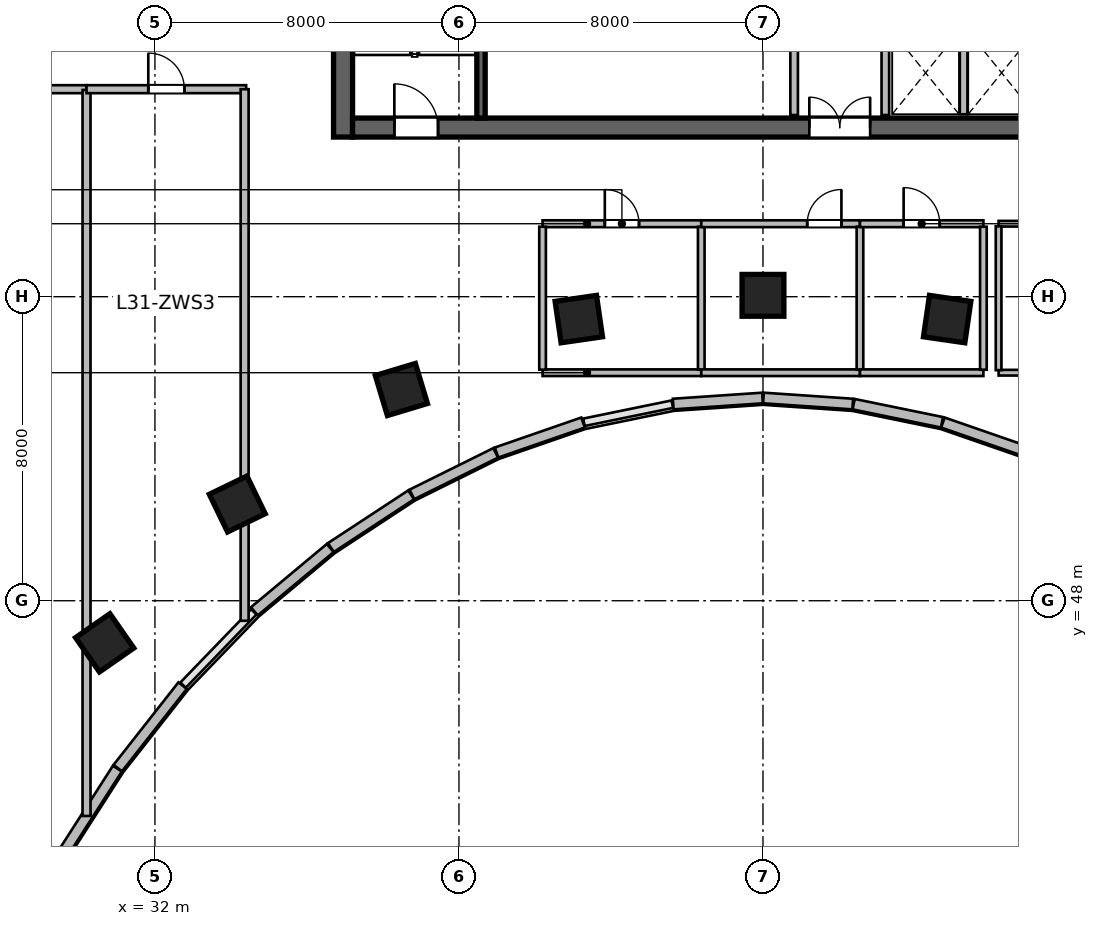
"""IFC4 building model, lengths in metres.
Left out: names, types, materials, properties, quantities, classifications, styles, units other than length and angle.
Written with IfcOpenShell. Run it as: python <this file> out.ifc"""

import sys

from ifc_helpers import new_model, si_unit, direction, frame, frame_2d, origin, origin_2d, place, context, subcontext, project, spatial, rectangle, extrude, source, transform, mapped, element, fill, save


model = new_model("IFC4")
c1 = context("Model", 3, precision=1e-05, world=origin(), true_north=direction((0.0, 1.0)))
c2 = subcontext(c1, "Body", "Model", "MODEL_VIEW")
j1 = project(units=[si_unit("LENGTHUNIT", "METRE"), si_unit("PLANEANGLEUNIT", "RADIAN")], contexts=[c1])
p1 = place(None, origin())
s1 = spatial("IfcSite", under=j1, at=p1, CompositionType="ELEMENT")
p2 = place(p1, origin())
s2 = spatial("IfcBuilding", under=s1, at=p2, CompositionType="ELEMENT")
p3 = place(p2, frame((0.0, 0.0, 131.1)))
s3 = spatial("IfcBuildingStorey", under=s2, at=p3, CompositionType="ELEMENT", Elevation=131.1)
m1 = source(origin(), c2, "Body", "SweptSolid", [
    extrude(rectangle(XDim=12.0, YDim=0.5, at=frame_2d((6.0, 0.0))), origin(), (0.0, 0.0, 1.0), 3.9),
])
p4 = place(p3, frame((36.95, 60.2, 0.0), z_axis=(0.0, 0.0, 1.0), x_axis=(0.0, 1.0, 0.0)))
e1 = element("IfcWall", 1, at=p4, inside=s3, PredefinedType="SHEAR", context=c2, shape_type="MappedRepresentation", body=[
    mapped(m1, transform((0.0, 0.0, 0.0), scale=1.0)),
])
m2 = source(origin(), c2, "Body", "SweptSolid", [
    extrude(rectangle(XDim=21.6, YDim=0.5, at=frame_2d((10.8, 0.0))), origin(), (0.0, 0.0, 1.0), 3.9),
])
p5 = place(p3, frame((37.2, 60.45, 0.0), z_axis=(0.0, 0.0, 1.0), x_axis=(1.0, 0.0, 0.0)))
e2 = element("IfcWall", 2, at=p5, inside=s3, PredefinedType="SHEAR", context=c2, shape_type="MappedRepresentation", body=[
    mapped(m2, transform((0.0, 0.0, 0.0), scale=1.0)),
])
p6 = place(p5, frame((1.1, 0.0, 0.0)))
e3 = element("IfcOpeningElement", 3, at=p6, cuts=e2, PredefinedType="OPENING", context=c2, shape_type="SweptSolid", body=[
    extrude(rectangle(XDim=1.15, YDim=2.15, at=frame_2d((0.575, 1.075))), frame((0.0, 0.26, 0.0), z_axis=(0.0, -1.0, 0.0), x_axis=(1.0, 0.0, 0.0)), (0.0, 0.0, 1.0), 0.52),
])
p7 = place(p5, frame((19.5, 0.0, 0.0)))
e4 = element("IfcOpeningElement", 4, at=p7, cuts=e2, PredefinedType="OPENING", context=c2, shape_type="SweptSolid", body=[
    extrude(rectangle(XDim=0.9, YDim=2.1, at=frame_2d((0.45, 1.05))), frame((0.0, 0.26, 0.0), z_axis=(0.0, -1.0, 0.0), x_axis=(1.0, 0.0, 0.0)), (0.0, 0.0, 1.0), 0.52),
])
p8 = place(p5, frame((12.02, 0.0, 0.0)))
e5 = element("IfcOpeningElement", 5, at=p8, cuts=e2, PredefinedType="OPENING", context=c2, shape_type="SweptSolid", body=[
    extrude(rectangle(XDim=1.6, YDim=2.15, at=frame_2d((0.8, 1.075))), frame((0.0, 0.26, 0.0), z_axis=(0.0, -1.0, 0.0), x_axis=(1.0, 0.0, 0.0)), (0.0, 0.0, 1.0), 0.52),
])
m3 = source(origin(), c2, "Body", "SweptSolid", [
    extrude(rectangle(XDim=11.0, YDim=0.22, at=frame_2d((5.5, 0.0))), origin(), (0.0, 0.0, 1.0), 3.9),
])
p9 = place(p3, frame((40.58, 60.7, 0.0), z_axis=(0.0, 0.0, 1.0), x_axis=(0.0, 1.0, 0.0)))
e6 = element("IfcWall", 6, at=p9, inside=s3, PredefinedType="SHEAR", context=c2, shape_type="MappedRepresentation", body=[
    mapped(m3, transform((0.0, 0.0, 0.0), scale=1.0)),
])
m4 = source(origin(), c2, "Body", "SweptSolid", [
    extrude(rectangle(XDim=1.1, YDim=1.1, at=origin_2d()), origin(), (0.0, 0.0, 1.0), 3.9),
])
for number, where, z_axis, x_axis in (
    (7, (30.677, 46.892, 0.0), (0.0, 0.0, 1.0), (-0.571, 0.821, 0.0)),
    (8, (34.166, 50.545, 0.0), (0.0, 0.0, 1.0), (-0.436, 0.9, 0.0)),
    (9, (38.485, 53.558, 0.0), (0.0, 0.0, 1.0), (-0.289, 0.957, 0.0)),
    (10, (43.154, 55.411, 0.0), (0.0, 0.0, 1.0), (-0.143, 0.99, 0.0)),
    (11, (48.0, 56.036, 0.0), (0.0, 0.0, 1.0), (0.0, 1.0, 0.0)),
    (12, (52.846, 55.411, 0.0), (0.0, 0.0, 1.0), (0.143, 0.99, 0.0)),
):
    element("IfcColumn", number, at=place(p3, frame(where, z_axis=z_axis, x_axis=x_axis)), inside=s3, PredefinedType="COLUMN", context=c2, shape_type="MappedRepresentation", body=[
        mapped(m4, transform((0.0, 0.0, 0.0), scale=1.0)),
    ])
m5 = source(origin(), c2, "Body", "SweptSolid", [
    extrude(rectangle(XDim=2.411, YDim=0.28, at=frame_2d((1.205, 0.0))), origin(), (0.0, 0.0, 1.0), 3.65),
])
p10 = place(p3, frame((55.012, 51.899, 0.0), z_axis=(0.0, 0.0, 1.0), x_axis=(-0.944880068161, 0.327416640982, 0.0)))
e13 = element("IfcWall", 13, at=p10, inside=s3, PredefinedType="SOLIDWALL", context=c2, shape_type="MappedRepresentation", body=[
    mapped(m5, transform((0.0, 0.0, 0.0), scale=1.0)),
])
m6 = source(origin(), c2, "Body", "SweptSolid", [
    extrude(rectangle(XDim=2.374, YDim=0.28, at=frame_2d((1.187, 0.0))), origin(), (0.0, 0.0, 1.0), 3.65),
])
p11 = place(p3, frame((52.711, 52.695, 0.0), z_axis=(0.0, 0.0, 1.0), x_axis=(-0.979619827472, 0.200860632341, 0.0)))
e14 = element("IfcWall", 14, at=p11, inside=s3, PredefinedType="SOLIDWALL", context=c2, shape_type="MappedRepresentation", body=[
    mapped(m6, transform((0.0, 0.0, 0.0), scale=1.0)),
])
m7 = source(origin(), c2, "Body", "SweptSolid", [
    extrude(rectangle(XDim=2.355, YDim=0.28, at=frame_2d((1.177, 0.0))), origin(), (0.0, 0.0, 1.0), 3.65),
])
for number, where, z_axis, x_axis in (
    (15, (50.362, 53.175, 0.0), (0.0, 0.0, 1.0), (-0.998, 0.068, 0.0)),
    (16, (47.988, 53.335, 0.0), (0.0, 0.0, 1.0), (-0.998, -0.068, 0.0)),
):
    element("IfcWall", number, at=place(p3, frame(where, z_axis=z_axis, x_axis=x_axis)), inside=s3, PredefinedType="SOLIDWALL", context=c2, shape_type="MappedRepresentation", body=[
        mapped(m7, transform((0.0, 0.0, 0.0), scale=1.0)),
    ])
p12 = place(p3, frame((43.266, 52.689, 0.0), z_axis=(0.0, 0.0, 1.0), x_axis=(-0.944880068161, -0.327416640982, 0.0)))
e17 = element("IfcWall", 17, at=p12, inside=s3, PredefinedType="SOLIDWALL", context=c2, shape_type="MappedRepresentation", body=[
    mapped(m5, transform((0.0, 0.0, 0.0), scale=1.0)),
])
m8 = source(origin(), c2, "Body", "SweptSolid", [
    extrude(rectangle(XDim=2.462, YDim=0.28, at=frame_2d((1.231, 0.0))), origin(), (0.0, 0.0, 1.0), 3.65),
])
p13 = place(p3, frame((40.967, 51.891, 0.0), z_axis=(0.0, 0.0, 1.0), x_axis=(-0.8959882207, -0.444077817917, 0.0)))
e18 = element("IfcWall", 18, at=p13, inside=s3, PredefinedType="SOLIDWALL", context=c2, shape_type="MappedRepresentation", body=[
    mapped(m8, transform((0.0, 0.0, 0.0), scale=1.0)),
])
m9 = source(origin(), c2, "Body", "SweptSolid", [
    extrude(rectangle(XDim=2.527, YDim=0.28, at=frame_2d((1.264, 0.0))), origin(), (0.0, 0.0, 1.0), 3.65),
])
p14 = place(p3, frame((38.742, 50.786, 0.0), z_axis=(0.0, 0.0, 1.0), x_axis=(-0.836011905051, -0.548711303523, 0.0)))
e19 = element("IfcWall", 19, at=p14, inside=s3, PredefinedType="SOLIDWALL", context=c2, shape_type="MappedRepresentation", body=[
    mapped(m9, transform((0.0, 0.0, 0.0), scale=1.0)),
])
m10 = source(origin(), c2, "Body", "SweptSolid", [
    extrude(rectangle(XDim=2.601, YDim=0.28, at=frame_2d((1.3, 0.0))), origin(), (0.0, 0.0, 1.0), 3.65),
])
p15 = place(p3, frame((36.613, 49.387, 0.0), z_axis=(0.0, 0.0, 1.0), x_axis=(-0.76796730295, -0.640489048775, 0.0)))
e20 = element("IfcWall", 20, at=p15, inside=s3, PredefinedType="SOLIDWALL", context=c2, shape_type="MappedRepresentation", body=[
    mapped(m10, transform((0.0, 0.0, 0.0), scale=1.0)),
])
m11 = source(origin(), c2, "Body", "SweptSolid", [
    extrude(rectangle(XDim=2.76, YDim=0.28, at=frame_2d((1.38, 0.0))), origin(), (0.0, 0.0, 1.0), 3.65),
])
p16 = place(p3, frame((32.728, 45.766, 0.0), z_axis=(0.0, 0.0, 1.0), x_axis=(-0.618180818641, -0.786035925047, 0.0)))
e21 = element("IfcWall", 21, at=p16, inside=s3, PredefinedType="SOLIDWALL", context=c2, shape_type="MappedRepresentation", body=[
    mapped(m11, transform((0.0, 0.0, 0.0), scale=1.0)),
])
m12 = source(origin(), c2, "Body", "SweptSolid", [
    extrude(rectangle(XDim=2.84, YDim=0.28, at=frame_2d((1.42, 0.0))), origin(), (0.0, 0.0, 1.0), 3.65),
])
p17 = place(p3, frame((31.011, 43.582, 0.0), z_axis=(0.0, 0.0, 1.0), x_axis=(-0.540214368057, -0.841527442538, 0.0)))
e22 = element("IfcWall", 22, at=p17, inside=s3, PredefinedType="SOLIDWALL", context=c2, shape_type="MappedRepresentation", body=[
    mapped(m12, transform((0.0, 0.0, 0.0), scale=1.0)),
])
m13 = source(origin(), c2, "Body", "SweptSolid", [
    extrude(rectangle(XDim=2.24, YDim=0.2, at=frame_2d((1.12, 0.0))), origin(), (0.0, 0.0, 1.0), 3.65),
])
for number, where, z_axis, x_axis in (
    (23, (48.82, 60.78, 0.0), (0.0, 0.0, 1.0), (0.0, 1.0, 0.0)),
    (24, (51.22, 60.78, 0.0), (0.0, 0.0, 1.0), (0.0, 1.0, 0.0)),
):
    element("IfcWall", number, at=place(p3, frame(where, z_axis=z_axis, x_axis=x_axis)), inside=s3, PredefinedType="SOLIDWALL", context=c2, shape_type="MappedRepresentation", body=[
        mapped(m13, transform((0.0, 0.0, 0.0), scale=1.0)),
    ])
m14 = source(origin(), c2, "Body", "SweptSolid", [
    extrude(rectangle(XDim=2.2, YDim=0.2, at=frame_2d((1.1, 0.0))), origin(), (0.0, 0.0, 1.0), 3.65),
])
p18 = place(p3, frame((53.28, 60.8, 0.0), z_axis=(0.0, 0.0, 1.0), x_axis=(0.0, 1.0, 0.0)))
e25 = element("IfcWall", 25, at=p18, inside=s3, PredefinedType="SOLIDWALL", context=c2, shape_type="MappedRepresentation", body=[
    mapped(m14, transform((0.0, 0.0, 0.0), scale=1.0)),
])
m15 = source(origin(), c2, "Body", "SweptSolid", [
    extrude(rectangle(XDim=4.176, YDim=0.175, at=frame_2d((2.088, 0.0))), origin(), (0.0, 0.0, 1.0), 3.65),
])
p19 = place(p3, frame((42.2, 54.0, 0.0), z_axis=(0.0, 0.0, 1.0), x_axis=(1.0, 0.0, 0.0)))
e26 = element("IfcWall", 26, at=p19, inside=s3, PredefinedType="PARTITIONING", context=c2, shape_type="MappedRepresentation", body=[
    mapped(m15, transform((0.0, 0.0, 0.0), scale=1.0)),
])
m16 = source(origin(), c2, "Body", "SweptSolid", [
    extrude(rectangle(XDim=4.176, YDim=0.18, at=frame_2d((2.088, 0.0))), origin(), (0.0, 0.0, 1.0), 3.65),
])
p20 = place(p3, frame((42.2, 57.92, 0.0), z_axis=(0.0, 0.0, 1.0), x_axis=(1.0, 0.0, 0.0)))
e27 = element("IfcWall", 27, at=p20, inside=s3, PredefinedType="PLUMBINGWALL", context=c2, shape_type="MappedRepresentation", body=[
    mapped(m16, transform((0.0, 0.0, 0.0), scale=1.0)),
])
p21 = place(p20, frame((1.638, 0.0, 0.0)))
e28 = element("IfcOpeningElement", 28, at=p21, cuts=e27, PredefinedType="OPENING", context=c2, shape_type="SweptSolid", body=[
    extrude(rectangle(XDim=0.9, YDim=2.08, at=frame_2d((0.45, 1.04))), frame((0.0, 0.1, 0.0), z_axis=(0.0, -1.0, 0.0), x_axis=(1.0, 0.0, 0.0)), (0.0, 0.0, 1.0), 0.2),
])
m17 = source(origin(), c2, "Body", "SweptSolid", [
    extrude(rectangle(XDim=3.763, YDim=0.175, at=frame_2d((1.881, 0.0))), origin(), (0.0, 0.0, 1.0), 3.65),
])
for number, where, z_axis, x_axis in (
    (29, (42.2, 54.079, 0.0), (0.0, 0.0, 1.0), (0.0, 1.0, 0.0)),
    (30, (46.376, 54.079, 0.0), (0.0, 0.0, 1.0), (0.0, 1.0, 0.0)),
):
    element("IfcWall", number, at=place(p3, frame(where, z_axis=z_axis, x_axis=x_axis)), inside=s3, PredefinedType="PARTITIONING", context=c2, shape_type="MappedRepresentation", body=[
        mapped(m17, transform((0.0, 0.0, 0.0), scale=1.0)),
    ])
p22 = place(p3, frame((46.376, 54.0, 0.0), z_axis=(0.0, 0.0, 1.0), x_axis=(1.0, 0.0, 0.0)))
e31 = element("IfcWall", 31, at=p22, inside=s3, PredefinedType="PARTITIONING", context=c2, shape_type="MappedRepresentation", body=[
    mapped(m15, transform((0.0, 0.0, 0.0), scale=1.0)),
])
p23 = place(p3, frame((46.376, 57.92, 0.0), z_axis=(0.0, 0.0, 1.0), x_axis=(1.0, 0.0, 0.0)))
e32 = element("IfcWall", 32, at=p23, inside=s3, PredefinedType="PLUMBINGWALL", context=c2, shape_type="MappedRepresentation", body=[
    mapped(m16, transform((0.0, 0.0, 0.0), scale=1.0)),
])
p24 = place(p23, frame((2.788, 0.0, 0.0)))
e33 = element("IfcOpeningElement", 33, at=p24, cuts=e32, PredefinedType="OPENING", context=c2, shape_type="SweptSolid", body=[
    extrude(rectangle(XDim=0.9, YDim=2.08, at=frame_2d((0.45, 1.04))), frame((0.0, 0.1, 0.0), z_axis=(0.0, -1.0, 0.0), x_axis=(1.0, 0.0, 0.0)), (0.0, 0.0, 1.0), 0.2),
])
p25 = place(p3, frame((50.552, 54.079, 0.0), z_axis=(0.0, 0.0, 1.0), x_axis=(0.0, 1.0, 0.0)))
e34 = element("IfcWall", 34, at=p25, inside=s3, PredefinedType="PARTITIONING", context=c2, shape_type="MappedRepresentation", body=[
    mapped(m17, transform((0.0, 0.0, 0.0), scale=1.0)),
])
m18 = source(origin(), c2, "Body", "SweptSolid", [
    extrude(rectangle(XDim=3.248, YDim=0.175, at=frame_2d((1.624, 0.0))), origin(), (0.0, 0.0, 1.0), 3.65),
])
p26 = place(p3, frame((50.552, 54.0, 0.0), z_axis=(0.0, 0.0, 1.0), x_axis=(1.0, 0.0, 0.0)))
e35 = element("IfcWall", 35, at=p26, inside=s3, PredefinedType="PARTITIONING", context=c2, shape_type="MappedRepresentation", body=[
    mapped(m18, transform((0.0, 0.0, 0.0), scale=1.0)),
])
m19 = source(origin(), c2, "Body", "SweptSolid", [
    extrude(rectangle(XDim=3.248, YDim=0.18, at=frame_2d((1.624, 0.0))), origin(), (0.0, 0.0, 1.0), 3.65),
])
p27 = place(p3, frame((50.552, 57.92, 0.0), z_axis=(0.0, 0.0, 1.0), x_axis=(1.0, 0.0, 0.0)))
e36 = element("IfcWall", 36, at=p27, inside=s3, PredefinedType="PLUMBINGWALL", context=c2, shape_type="MappedRepresentation", body=[
    mapped(m19, transform((0.0, 0.0, 0.0), scale=1.0)),
])
p28 = place(p27, frame((1.149, 0.0, 0.0)))
e37 = element("IfcOpeningElement", 37, at=p28, cuts=e36, PredefinedType="OPENING", context=c2, shape_type="SweptSolid", body=[
    extrude(rectangle(XDim=0.95, YDim=2.12, at=frame_2d((0.475, 1.06))), frame((0.0, 0.1, 0.0), z_axis=(0.0, -1.0, 0.0), x_axis=(1.0, 0.0, 0.0)), (0.0, 0.0, 1.0), 0.2),
])
p29 = place(p3, frame((53.8, 54.079, 0.0), z_axis=(0.0, 0.0, 1.0), x_axis=(0.0, 1.0, 0.0)))
e38 = element("IfcWall", 38, at=p29, inside=s3, PredefinedType="PARTITIONING", context=c2, shape_type="MappedRepresentation", body=[
    mapped(m17, transform((0.0, 0.0, 0.0), scale=1.0)),
])
m20 = source(origin(), c2, "Body", "SweptSolid", [
    extrude(rectangle(XDim=6.6, YDim=0.15, at=frame_2d((3.3, 0.0))), origin(), (0.0, 0.0, 1.0), 3.095),
])
p30 = place(p3, frame((54.2, 54.0, 0.0), z_axis=(0.0, 0.0, 1.0), x_axis=(1.0, 0.0, 0.0)))
e39 = element("IfcWall", 39, at=p30, inside=s3, PredefinedType="PARTITIONING", context=c2, shape_type="MappedRepresentation", body=[
    mapped(m20, transform((0.0, 0.0, 0.0), scale=1.0)),
])
m21 = source(origin(), c2, "Body", "SweptSolid", [
    extrude(rectangle(XDim=6.6, YDim=0.15, at=frame_2d((3.3, 0.0))), origin(), (0.0, 0.0, 1.0), 3.65),
])
p31 = place(p3, frame((54.2, 57.92, 0.0), z_axis=(0.0, 0.0, 1.0), x_axis=(1.0, 0.0, 0.0)))
e40 = element("IfcWall", 40, at=p31, inside=s3, PredefinedType="PARTITIONING", context=c2, shape_type="MappedRepresentation", body=[
    mapped(m21, transform((0.0, 0.0, 0.0), scale=1.0)),
])
p32 = place(p31, frame((2.825, 0.0, 0.0)))
e41 = element("IfcOpeningElement", 41, at=p32, cuts=e40, PredefinedType="OPENING", context=c2, shape_type="SweptSolid", body=[
    extrude(rectangle(XDim=0.95, YDim=2.1, at=frame_2d((0.475, 1.05))), frame((0.0, 0.085, 0.0), z_axis=(0.0, -1.0, 0.0), x_axis=(1.0, 0.0, 0.0)), (0.0, 0.0, 1.0), 0.17),
])
m22 = source(origin(), c2, "Body", "SweptSolid", [
    extrude(rectangle(XDim=3.785, YDim=0.15, at=frame_2d((1.893, 0.0))), origin(), (0.0, 0.0, 1.0), 3.65),
])
p33 = place(p3, frame((54.2, 54.067, 0.0), z_axis=(0.0, 0.0, 1.0), x_axis=(0.0, 1.0, 0.0)))
e42 = element("IfcWall", 42, at=p33, inside=s3, PredefinedType="PARTITIONING", context=c2, shape_type="MappedRepresentation", body=[
    mapped(m22, transform((0.0, 0.0, 0.0), scale=1.0)),
])
m23 = source(origin(), c2, "Body", "SweptSolid", [
    extrude(rectangle(XDim=4.0, YDim=0.21, at=frame_2d((2.0, 0.0))), origin(), (0.0, 0.0, 1.0), 3.65),
])
p34 = place(p3, frame((26.2, 61.46, 0.0), z_axis=(0.0, 0.0, 1.0), x_axis=(1.0, 0.0, 0.0)))
e43 = element("IfcWall", 43, at=p34, inside=s3, PredefinedType="PARTITIONING", context=c2, shape_type="MappedRepresentation", body=[
    mapped(m23, transform((0.0, 0.0, 0.0), scale=1.0)),
])
p35 = place(p34, frame((1.525, 0.0, 0.0)))
e44 = element("IfcOpeningElement", 44, at=p35, cuts=e43, PredefinedType="OPENING", context=c2, shape_type="SweptSolid", body=[
    extrude(rectangle(XDim=0.95, YDim=2.1, at=frame_2d((0.475, 1.05))), frame((0.0, 0.115, 0.0), z_axis=(0.0, -1.0, 0.0), x_axis=(1.0, 0.0, 0.0)), (0.0, 0.0, 1.0), 0.23),
])
m24 = source(origin(), c2, "Body", "SweptSolid", [
    extrude(rectangle(XDim=19.103, YDim=0.21, at=frame_2d((9.552, 0.0))), origin(), (0.0, 0.0, 1.0), 2.942),
])
p36 = place(p3, frame((30.2, 42.337, 0.0), z_axis=(0.0, 0.0, 1.0), x_axis=(0.0, 1.0, 0.0)))
e45 = element("IfcWall", 45, at=p36, inside=s3, PredefinedType="PARTITIONING", context=c2, shape_type="MappedRepresentation", body=[
    mapped(m24, transform((0.0, 0.0, 0.0), scale=1.0)),
])
m25 = source(origin(), c2, "Body", "SweptSolid", [
    extrude(rectangle(XDim=4.2, YDim=0.21, at=frame_2d((2.1, 0.0))), origin(), (0.0, 0.0, 1.0), 3.65),
])
p37 = place(p3, frame((30.2, 61.46, 0.0), z_axis=(0.0, 0.0, 1.0), x_axis=(1.0, 0.0, 0.0)))
e46 = element("IfcWall", 46, at=p37, inside=s3, PredefinedType="PARTITIONING", context=c2, shape_type="MappedRepresentation", body=[
    mapped(m25, transform((0.0, 0.0, 0.0), scale=1.0)),
])
p38 = place(p37, frame((1.625, 0.0, 0.0)))
e47 = element("IfcOpeningElement", 47, at=p38, cuts=e46, PredefinedType="OPENING", context=c2, shape_type="SweptSolid", body=[
    extrude(rectangle(XDim=0.95, YDim=2.1, at=frame_2d((0.475, 1.05))), frame((0.0, 0.115, 0.0), z_axis=(0.0, -1.0, 0.0), x_axis=(1.0, 0.0, 0.0)), (0.0, 0.0, 1.0), 0.23),
])
m26 = source(origin(), c2, "Body", "SweptSolid", [
    extrude(rectangle(XDim=13.988, YDim=0.21, at=frame_2d((6.994, 0.0))), origin(), (0.0, 0.0, 1.0), 3.65),
])
p39 = place(p3, frame((34.36, 47.472, 0.0), z_axis=(0.0, 0.0, 1.0), x_axis=(0.0, 1.0, 0.0)))
e48 = element("IfcWall", 48, at=p39, inside=s3, PredefinedType="PARTITIONING", context=c2, shape_type="MappedRepresentation", body=[
    mapped(m26, transform((0.0, 0.0, 0.0), scale=1.0)),
])
m27 = source(origin(), c2, "Body", "SweptSolid", [
    extrude(rectangle(XDim=1.15, YDim=2.15, at=frame_2d((0.575, 1.075))), frame((0.0, 0.025, 0.0), z_axis=(0.0, -1.0, 0.0), x_axis=(1.0, 0.0, 0.0)), (0.0, 0.0, 1.0), 0.05),
])
p40 = place(p6, origin())
e49 = element("IfcDoor", 49, at=p40, inside=s3, OperationType="SINGLE_SWING_LEFT", PredefinedType="DOOR", context=c2, shape_type="MappedRepresentation", body=[
    mapped(m27, transform((0.0, 0.0, 0.0), scale=1.0)),
])
fill(e3, e49)
m28 = source(origin(), c2, "Body", "SweptSolid", [
    extrude(rectangle(XDim=1.6, YDim=2.15, at=frame_2d((0.8, 1.075))), frame((0.0, 0.025, 0.0), z_axis=(0.0, -1.0, 0.0), x_axis=(1.0, 0.0, 0.0)), (0.0, 0.0, 1.0), 0.05),
])
p41 = place(p8, origin())
e50 = element("IfcDoor", 50, at=p41, inside=s3, OperationType="DOUBLE_DOOR_SINGLE_SWING", PredefinedType="DOOR", context=c2, shape_type="MappedRepresentation", body=[
    mapped(m28, transform((0.0, 0.0, 0.0), scale=1.0)),
])
fill(e5, e50)
m29 = source(origin(), c2, "Body", "SweptSolid", [
    extrude(rectangle(XDim=0.9, YDim=2.08, at=frame_2d((0.45, 1.04))), frame((0.0, 0.025, 0.0), z_axis=(0.0, -1.0, 0.0), x_axis=(1.0, 0.0, 0.0)), (0.0, 0.0, 1.0), 0.05),
])
p42 = place(p21, origin())
e51 = element("IfcDoor", 51, at=p42, inside=s3, OperationType="SINGLE_SWING_LEFT", PredefinedType="DOOR", context=c2, shape_type="MappedRepresentation", body=[
    mapped(m29, transform((0.0, 0.0, 0.0), scale=1.0)),
])
fill(e28, e51)
p43 = place(p24, origin())
e52 = element("IfcDoor", 52, at=p43, inside=s3, OperationType="SINGLE_SWING_RIGHT", PredefinedType="DOOR", context=c2, shape_type="MappedRepresentation", body=[
    mapped(m29, transform((0.0, 0.0, 0.0), scale=1.0)),
])
fill(e33, e52)
m30 = source(origin(), c2, "Body", "SweptSolid", [
    extrude(rectangle(XDim=0.95, YDim=2.12, at=frame_2d((0.475, 1.06))), frame((0.0, 0.025, 0.0), z_axis=(0.0, -1.0, 0.0), x_axis=(1.0, 0.0, 0.0)), (0.0, 0.0, 1.0), 0.05),
])
p44 = place(p28, origin())
e53 = element("IfcDoor", 53, at=p44, inside=s3, OperationType="SINGLE_SWING_LEFT", PredefinedType="DOOR", context=c2, shape_type="MappedRepresentation", body=[
    mapped(m30, transform((0.0, 0.0, 0.0), scale=1.0)),
])
fill(e37, e53)
m31 = source(origin(), c2, "Body", "SweptSolid", [
    extrude(rectangle(XDim=0.95, YDim=2.1, at=frame_2d((0.475, 1.05))), frame((0.0, 0.025, 0.0), z_axis=(0.0, -1.0, 0.0), x_axis=(1.0, 0.0, 0.0)), (0.0, 0.0, 1.0), 0.05),
])
p45 = place(p38, origin())
e54 = element("IfcDoor", 54, at=p45, inside=s3, OperationType="SINGLE_SWING_LEFT", PredefinedType="DOOR", context=c2, shape_type="MappedRepresentation", body=[
    mapped(m31, transform((0.0, 0.0, 0.0), scale=1.0)),
])
fill(e47, e54)
save(model, sys.argv[1])
